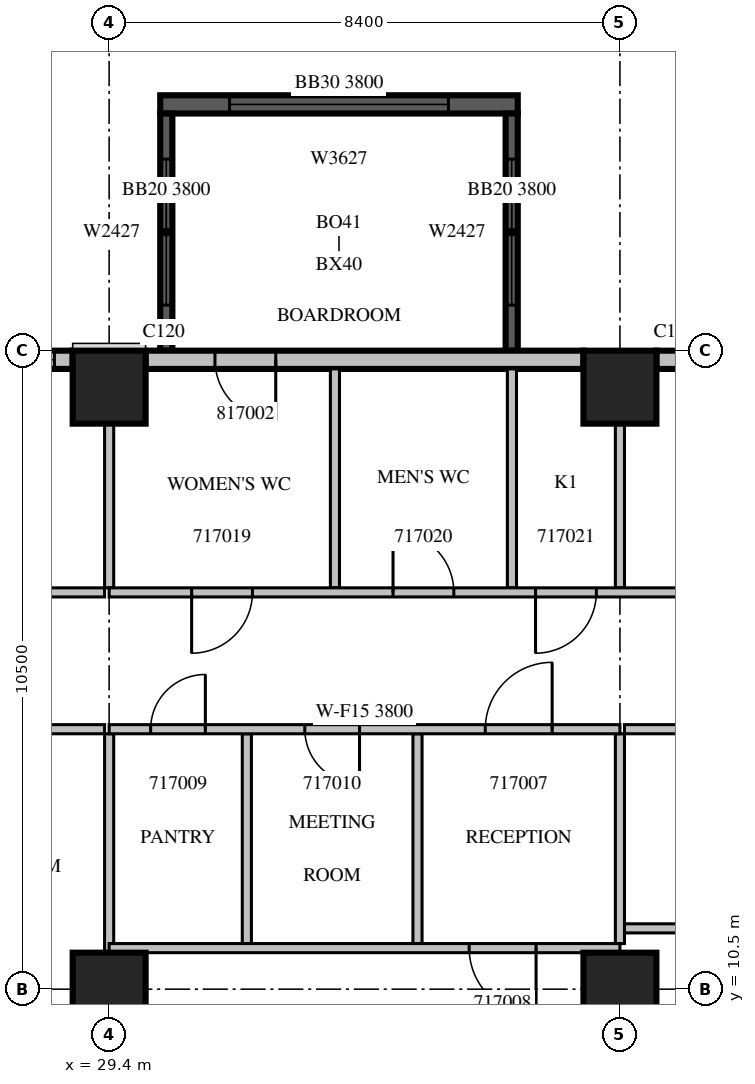
"""IFC4 building model, lengths in metres.
Left out: names, types, materials, properties, quantities, classifications, styles, units other than length and angle.
Written with IfcOpenShell. Run it as: python <this file> out.ifc"""

import sys

from ifc_helpers import new_model, si_unit, direction, frame, frame_2d, origin, origin_2d, place, context, subcontext, project, spatial, rectangle, extrude, source, transform, mapped, element, fill, save


model = new_model("IFC4")
c1 = context("Model", 3, precision=1e-05, world=origin(), true_north=direction((0.0, 1.0)))
c2 = subcontext(c1, "Body", "Model", "MODEL_VIEW")
j1 = project(units=[si_unit("LENGTHUNIT", "METRE"), si_unit("PLANEANGLEUNIT", "RADIAN")], contexts=[c1])
p1 = place(None, origin())
s1 = spatial("IfcSite", under=j1, at=p1, CompositionType="ELEMENT")
p2 = place(p1, origin())
s2 = spatial("IfcBuilding", under=s1, at=p2, CompositionType="ELEMENT")
p3 = place(p2, frame((0.0, 0.0, 82.5)))
s3 = spatial("IfcBuildingStorey", under=s2, at=p3, CompositionType="ELEMENT", Elevation=82.5)
m1 = source(origin(), c2, "Body", "SweptSolid", [
    extrude(rectangle(XDim=1.2, YDim=1.2, at=origin_2d()), origin(), (0.0, 0.0, 1.0), 4.2),
])
for number, where, z_axis, x_axis in (
    (1, (29.4, 10.5, 0.0), (0.0, 0.0, 1.0), (1.0, 0.0, 0.0)),
    (2, (37.8, 10.5, 0.0), (0.0, 0.0, 1.0), (1.0, 0.0, 0.0)),
    (3, (29.4, 20.4, 0.0), (0.0, 0.0, 1.0), (1.0, 0.0, 0.0)),
    (4, (37.8, 20.4, 0.0), (0.0, 0.0, 1.0), (1.0, 0.0, 0.0)),
):
    element("IfcColumn", number, at=place(p3, frame(where, z_axis=z_axis, x_axis=x_axis)), inside=s3, PredefinedType="COLUMN", context=c2, shape_type="MappedRepresentation", body=[
        mapped(m1, transform((0.0, 0.0, 0.0), scale=1.0)),
    ])
m2 = source(origin(), c2, "Body", "SweptSolid", [
    extrude(rectangle(XDim=5.88, YDim=0.3, at=frame_2d((2.94, 0.0))), origin(), (0.0, 0.0, 1.0), 3.8),
])
p4 = place(p3, frame((36.12, 25.05, 0.0), z_axis=(0.0, 0.0, 1.0), x_axis=(-1.0, 0.0, 0.0)))
e5 = element("IfcWall", 5, at=p4, inside=s3, PredefinedType="SOLIDWALL", context=c2, shape_type="MappedRepresentation", body=[
    mapped(m2, transform((0.0, 0.0, 0.0), scale=1.0)),
])
m3 = source(origin(), c2, "Body", "SweptSolid", [
    extrude(rectangle(XDim=3.6, YDim=2.7, at=frame_2d((1.8, 1.35))), frame((0.0, 0.16, 0.0), z_axis=(0.0, -1.0, 0.0), x_axis=(1.0, 0.0, 0.0)), (0.0, 0.0, 1.0), 0.32),
])
p5 = place(p4, frame((1.14, 0.0, 0.6)))
e6 = element("IfcOpeningElement", 6, at=p5, cuts=e5, PredefinedType="OPENING", context=c2, shape_type="MappedRepresentation", body=[
    mapped(m3, transform((0.0, 0.0, 0.0), scale=1.0)),
])
m4 = source(origin(), c2, "Body", "SweptSolid", [
    extrude(rectangle(XDim=3.9, YDim=0.2, at=frame_2d((1.95, 0.0))), origin(), (0.0, 0.0, 1.0), 3.8),
])
p6 = place(p3, frame((36.02, 21.0, 0.0), z_axis=(0.0, 0.0, 1.0), x_axis=(0.0, 1.0, 0.0)))
e7 = element("IfcWall", 7, at=p6, inside=s3, PredefinedType="SOLIDWALL", context=c2, shape_type="MappedRepresentation", body=[
    mapped(m4, transform((0.0, 0.0, 0.0), scale=1.0)),
])
m5 = source(origin(), c2, "Body", "SweptSolid", [
    extrude(rectangle(XDim=2.4, YDim=2.7, at=frame_2d((1.2, 1.35))), frame((0.0, 0.11, 0.0), z_axis=(0.0, -1.0, 0.0), x_axis=(1.0, 0.0, 0.0)), (0.0, 0.0, 1.0), 0.22),
])
p7 = place(p6, frame((0.75, 0.0, 0.6)))
e8 = element("IfcOpeningElement", 8, at=p7, cuts=e7, PredefinedType="OPENING", context=c2, shape_type="MappedRepresentation", body=[
    mapped(m5, transform((0.0, 0.0, 0.0), scale=1.0)),
])
p8 = place(p3, frame((30.34, 21.0, 0.0), z_axis=(0.0, 0.0, 1.0), x_axis=(0.0, 1.0, 0.0)))
e9 = element("IfcWall", 9, at=p8, inside=s3, PredefinedType="SOLIDWALL", context=c2, shape_type="MappedRepresentation", body=[
    mapped(m4, transform((0.0, 0.0, 0.0), scale=1.0)),
])
p9 = place(p8, frame((0.75, 0.0, 0.6)))
e10 = element("IfcOpeningElement", 10, at=p9, cuts=e9, PredefinedType="OPENING", context=c2, shape_type="MappedRepresentation", body=[
    mapped(m5, transform((0.0, 0.0, 0.0), scale=1.0)),
])
m6 = source(origin(), c2, "Body", "SweptSolid", [
    extrude(rectangle(XDim=7.2, YDim=0.3, at=frame_2d((3.6, 0.0))), origin(), (0.0, 0.0, 1.0), 3.8),
])
p10 = place(p3, frame((45.6, 20.85, 0.0), z_axis=(0.0, 0.0, 1.0), x_axis=(-1.0, 0.0, 0.0)))
e11 = element("IfcWall", 11, at=p10, inside=s3, PredefinedType="STANDARD", context=c2, shape_type="MappedRepresentation", body=[
    mapped(m6, transform((0.0, 0.0, 0.0), scale=1.0)),
])
m7 = source(origin(), c2, "Body", "SweptSolid", [
    extrude(rectangle(XDim=2.4, YDim=2.7, at=frame_2d((1.2, 1.35))), frame((0.0, 0.16, 0.0), z_axis=(0.0, -1.0, 0.0), x_axis=(1.0, 0.0, 0.0)), (0.0, 0.0, 1.0), 0.32),
])
p11 = place(p10, frame((0.3, 0.0, 0.6)))
e12 = element("IfcOpeningElement", 12, at=p11, cuts=e11, PredefinedType="OPENING", context=c2, shape_type="MappedRepresentation", body=[
    mapped(m7, transform((0.0, 0.0, 0.0), scale=1.0)),
])
p12 = place(p10, frame((3.75, 0.0, 0.6)))
e13 = element("IfcOpeningElement", 13, at=p12, cuts=e11, PredefinedType="OPENING", context=c2, shape_type="MappedRepresentation", body=[
    mapped(m7, transform((0.0, 0.0, 0.0), scale=1.0)),
])
p13 = place(p3, frame((37.2, 20.85, 0.0), z_axis=(0.0, 0.0, 1.0), x_axis=(-1.0, 0.0, 0.0)))
e14 = element("IfcWall", 14, at=p13, inside=s3, PredefinedType="STANDARD", context=c2, shape_type="MappedRepresentation", body=[
    mapped(m6, transform((0.0, 0.0, 0.0), scale=1.0)),
])
m8 = source(origin(), c2, "Body", "SweptSolid", [
    extrude(rectangle(XDim=1.0, YDim=2.1, at=frame_2d((0.5, 1.05))), frame((0.0, 0.16, 0.0), z_axis=(0.0, -1.0, 0.0), x_axis=(1.0, 0.0, 0.0)), (0.0, 0.0, 1.0), 0.32),
])
p14 = place(p13, frame((5.06, 0.0, 0.0)))
e15 = element("IfcOpeningElement", 15, at=p14, cuts=e14, PredefinedType="OPENING", context=c2, shape_type="MappedRepresentation", body=[
    mapped(m8, transform((0.0, 0.0, 0.0), scale=1.0)),
])
m9 = source(origin(), c2, "Body", "SweptSolid", [
    extrude(rectangle(XDim=6.6, YDim=0.3, at=frame_2d((3.3, 0.0))), origin(), (0.0, 0.0, 1.0), 3.8),
])
p15 = place(p3, frame((28.8, 20.85, 0.0), z_axis=(0.0, 0.0, 1.0), x_axis=(-1.0, 0.0, 0.0)))
e16 = element("IfcWall", 16, at=p15, inside=s3, PredefinedType="STANDARD", context=c2, shape_type="MappedRepresentation", body=[
    mapped(m9, transform((0.0, 0.0, 0.0), scale=1.0)),
])
p16 = place(p15, frame((0.3, 0.0, 0.6)))
e17 = element("IfcOpeningElement", 17, at=p16, cuts=e16, PredefinedType="OPENING", context=c2, shape_type="MappedRepresentation", body=[
    mapped(m7, transform((0.0, 0.0, 0.0), scale=1.0)),
])
m10 = source(origin(), c2, "Body", "SweptSolid", [
    extrude(rectangle(XDim=1.2, YDim=2.7, at=frame_2d((0.6, 1.35))), frame((0.0, 0.16, 0.0), z_axis=(0.0, -1.0, 0.0), x_axis=(1.0, 0.0, 0.0)), (0.0, 0.0, 1.0), 0.32),
])
p17 = place(p15, frame((4.412, 0.0, 0.6)))
e18 = element("IfcOpeningElement", 18, at=p17, cuts=e16, PredefinedType="OPENING", context=c2, shape_type="MappedRepresentation", body=[
    mapped(m10, transform((0.0, 0.0, 0.0), scale=1.0)),
])
m11 = source(origin(), c2, "Body", "SweptSolid", [
    extrude(rectangle(XDim=4.45, YDim=0.15, at=frame_2d((2.225, 0.0))), origin(), (0.0, 0.0, 1.0), 3.8),
])
for number, where, z_axis, x_axis in (
    (19, (29.325, 14.775, 0.0), (0.0, 0.0, 1.0), (-1.0, 0.0, 0.0)),
    (20, (24.875, 17.025, 0.0), (0.0, 0.0, 1.0), (1.0, 0.0, 0.0)),
):
    element("IfcWall", number, at=place(p3, frame(where, z_axis=z_axis, x_axis=x_axis)), inside=s3, PredefinedType="PARTITIONING", context=c2, shape_type="MappedRepresentation", body=[
        mapped(m11, transform((0.0, 0.0, 0.0), scale=1.0)),
    ])
m12 = source(origin(), c2, "Body", "SweptSolid", [
    extrude(rectangle(XDim=3.601, YDim=0.15, at=frame_2d((1.8, 0.0))), origin(), (0.0, 0.0, 1.0), 3.8),
])
p18 = place(p3, frame((29.4, 11.099, 0.0), z_axis=(0.0, 0.0, 1.0), x_axis=(0.0, 1.0, 0.0)))
e21 = element("IfcWall", 21, at=p18, inside=s3, PredefinedType="PARTITIONING", context=c2, shape_type="MappedRepresentation", body=[
    mapped(m12, transform((0.0, 0.0, 0.0), scale=1.0)),
])
m13 = source(origin(), c2, "Body", "SweptSolid", [
    extrude(rectangle(XDim=2.701, YDim=0.15, at=frame_2d((1.351, 0.0))), origin(), (0.0, 0.0, 1.0), 3.8),
])
p19 = place(p3, frame((29.4, 17.1, 0.0), z_axis=(0.0, 0.0, 1.0), x_axis=(0.0, 1.0, 0.0)))
e22 = element("IfcWall", 22, at=p19, inside=s3, PredefinedType="PARTITIONING", context=c2, shape_type="MappedRepresentation", body=[
    mapped(m13, transform((0.0, 0.0, 0.0), scale=1.0)),
])
m14 = source(origin(), c2, "Body", "SweptSolid", [
    extrude(rectangle(XDim=6.45, YDim=0.15, at=frame_2d((3.225, 0.0))), origin(), (0.0, 0.0, 1.0), 3.8),
])
p20 = place(p3, frame((37.875, 11.5, 0.0), z_axis=(0.0, 0.0, 1.0), x_axis=(1.0, 0.0, 0.0)))
e23 = element("IfcWall", 23, at=p20, inside=s3, PredefinedType="PARTITIONING", context=c2, shape_type="MappedRepresentation", body=[
    mapped(m14, transform((0.0, 0.0, 0.0), scale=1.0)),
])
p21 = place(p3, frame((44.325, 14.775, 0.0), z_axis=(0.0, 0.0, 1.0), x_axis=(-1.0, 0.0, 0.0)))
e24 = element("IfcWall", 24, at=p21, inside=s3, PredefinedType="PARTITIONING", context=c2, shape_type="MappedRepresentation", body=[
    mapped(m14, transform((0.0, 0.0, 0.0), scale=1.0)),
])
m15 = source(origin(), c2, "Body", "SweptSolid", [
    extrude(rectangle(XDim=0.9, YDim=2.1, at=frame_2d((0.45, 1.05))), frame((0.0, 0.085, 0.0), z_axis=(0.0, -1.0, 0.0), x_axis=(1.0, 0.0, 0.0)), (0.0, 0.0, 1.0), 0.17),
])
p22 = place(p21, frame((2.812, 0.0, 0.0)))
e25 = element("IfcOpeningElement", 25, at=p22, cuts=e24, PredefinedType="OPENING", context=c2, shape_type="MappedRepresentation", body=[
    mapped(m15, transform((0.0, 0.0, 0.0), scale=1.0)),
])
m16 = source(origin(), c2, "Body", "SweptSolid", [
    extrude(rectangle(XDim=3.45, YDim=0.15, at=frame_2d((1.725, 0.0))), origin(), (0.0, 0.0, 1.0), 3.8),
])
for number, where, z_axis, x_axis in (
    (26, (31.665, 11.25, 0.0), (0.0, 0.0, 1.0), (0.0, 1.0, 0.0)),
    (27, (34.471, 11.25, 0.0), (0.0, 0.0, 1.0), (0.0, 1.0, 0.0)),
    (28, (37.8, 11.25, 0.0), (0.0, 0.0, 1.0), (0.0, 1.0, 0.0)),
):
    element("IfcWall", number, at=place(p3, frame(where, z_axis=z_axis, x_axis=x_axis)), inside=s3, PredefinedType="PARTITIONING", context=c2, shape_type="MappedRepresentation", body=[
        mapped(m16, transform((0.0, 0.0, 0.0), scale=1.0)),
    ])
m17 = source(origin(), c2, "Body", "SweptSolid", [
    extrude(rectangle(XDim=8.4, YDim=0.15, at=frame_2d((4.2, 0.0))), origin(), (0.0, 0.0, 1.0), 3.8),
])
p23 = place(p3, frame((37.8, 11.175, 0.0), z_axis=(0.0, 0.0, 1.0), x_axis=(-1.0, 0.0, 0.0)))
e29 = element("IfcWall", 29, at=p23, inside=s3, PredefinedType="PARTITIONING", context=c2, shape_type="MappedRepresentation", body=[
    mapped(m17, transform((0.0, 0.0, 0.0), scale=1.0)),
])
m18 = source(origin(), c2, "Body", "SweptSolid", [
    extrude(rectangle(XDim=1.1, YDim=2.1, at=frame_2d((0.55, 1.05))), frame((0.0, 0.085, 0.0), z_axis=(0.0, -1.0, 0.0), x_axis=(1.0, 0.0, 0.0)), (0.0, 0.0, 1.0), 0.17),
])
p24 = place(p23, frame((1.379, 0.0, 0.0)))
e30 = element("IfcOpeningElement", 30, at=p24, cuts=e29, PredefinedType="OPENING", context=c2, shape_type="MappedRepresentation", body=[
    mapped(m18, transform((0.0, 0.0, 0.0), scale=1.0)),
])
m19 = source(origin(), c2, "Body", "SweptSolid", [
    extrude(rectangle(XDim=3.6, YDim=0.15, at=frame_2d((1.8, 0.0))), origin(), (0.0, 0.0, 1.0), 3.8),
])
for number, where, z_axis, x_axis in (
    (31, (33.113, 20.7, 0.0), (0.0, 0.0, 1.0), (0.0, -1.0, 0.0)),
    (32, (36.024, 20.7, 0.0), (0.0, 0.0, 1.0), (0.0, -1.0, 0.0)),
):
    element("IfcWall", number, at=place(p3, frame(where, z_axis=z_axis, x_axis=x_axis)), inside=s3, PredefinedType="PARTITIONING", context=c2, shape_type="MappedRepresentation", body=[
        mapped(m19, transform((0.0, 0.0, 0.0), scale=1.0)),
    ])
p25 = place(p3, frame((37.8, 17.1, 0.0), z_axis=(0.0, 0.0, 1.0), x_axis=(0.0, 1.0, 0.0)))
e33 = element("IfcWall", 33, at=p25, inside=s3, PredefinedType="PARTITIONING", context=c2, shape_type="MappedRepresentation", body=[
    mapped(m13, transform((0.0, 0.0, 0.0), scale=1.0)),
])
p26 = place(p3, frame((37.8, 14.775, 0.0), z_axis=(0.0, 0.0, 1.0), x_axis=(-1.0, 0.0, 0.0)))
e34 = element("IfcWall", 34, at=p26, inside=s3, PredefinedType="PARTITIONING", context=c2, shape_type="MappedRepresentation", body=[
    mapped(m17, transform((0.0, 0.0, 0.0), scale=1.0)),
])
p27 = place(p26, frame((1.115, 0.0, 0.0)))
e35 = element("IfcOpeningElement", 35, at=p27, cuts=e34, PredefinedType="OPENING", context=c2, shape_type="MappedRepresentation", body=[
    mapped(m18, transform((0.0, 0.0, 0.0), scale=1.0)),
])
p28 = place(p26, frame((6.818, 0.0, 0.0)))
e36 = element("IfcOpeningElement", 36, at=p28, cuts=e34, PredefinedType="OPENING", context=c2, shape_type="MappedRepresentation", body=[
    mapped(m15, transform((0.0, 0.0, 0.0), scale=1.0)),
])
p29 = place(p26, frame((4.282, 0.0, 0.0)))
e37 = element("IfcOpeningElement", 37, at=p29, cuts=e34, PredefinedType="OPENING", context=c2, shape_type="MappedRepresentation", body=[
    mapped(m15, transform((0.0, 0.0, 0.0), scale=1.0)),
])
m20 = source(origin(), c2, "Body", "SweptSolid", [
    extrude(rectangle(XDim=37.5, YDim=0.15, at=frame_2d((18.75, 0.0))), origin(), (0.0, 0.0, 1.0), 3.8),
])
p30 = place(p3, frame((29.4, 17.025, 0.0), z_axis=(0.0, 0.0, 1.0), x_axis=(1.0, 0.0, 0.0)))
e38 = element("IfcWall", 38, at=p30, inside=s3, PredefinedType="PARTITIONING", context=c2, shape_type="MappedRepresentation", body=[
    mapped(m20, transform((0.0, 0.0, 0.0), scale=1.0)),
])
m21 = source(origin(), c2, "Body", "SweptSolid", [
    extrude(rectangle(XDim=1.0, YDim=2.1, at=frame_2d((0.5, 1.05))), frame((0.0, 0.085, 0.0), z_axis=(0.0, -1.0, 0.0), x_axis=(1.0, 0.0, 0.0)), (0.0, 0.0, 1.0), 0.17),
])
p31 = place(p30, frame((1.357, 0.0, 0.0)))
e39 = element("IfcOpeningElement", 39, at=p31, cuts=e38, PredefinedType="OPENING", context=c2, shape_type="MappedRepresentation", body=[
    mapped(m21, transform((0.0, 0.0, 0.0), scale=1.0)),
])
p32 = place(p30, frame((4.669, 0.0, 0.0)))
e40 = element("IfcOpeningElement", 40, at=p32, cuts=e38, PredefinedType="OPENING", context=c2, shape_type="MappedRepresentation", body=[
    mapped(m21, transform((0.0, 0.0, 0.0), scale=1.0)),
])
p33 = place(p30, frame((7.012, 0.0, 0.0)))
e41 = element("IfcOpeningElement", 41, at=p33, cuts=e38, PredefinedType="OPENING", context=c2, shape_type="MappedRepresentation", body=[
    mapped(m21, transform((0.0, 0.0, 0.0), scale=1.0)),
])
p34 = place(p30, frame((12.1, 0.0, 0.0)))
e42 = element("IfcOpeningElement", 42, at=p34, cuts=e38, PredefinedType="OPENING", context=c2, shape_type="MappedRepresentation", body=[
    mapped(m21, transform((0.0, 0.0, 0.0), scale=1.0)),
])
p35 = place(p30, frame((18.898, 0.0, 0.0)))
e43 = element("IfcOpeningElement", 43, at=p35, cuts=e38, PredefinedType="OPENING", context=c2, shape_type="MappedRepresentation", body=[
    mapped(m21, transform((0.0, 0.0, 0.0), scale=1.0)),
])
p36 = place(p30, frame((23.543, 0.0, 0.0)))
e44 = element("IfcOpeningElement", 44, at=p36, cuts=e38, PredefinedType="OPENING", context=c2, shape_type="MappedRepresentation", body=[
    mapped(m21, transform((0.0, 0.0, 0.0), scale=1.0)),
])
p37 = place(p30, frame((26.826, 0.0, 0.0)))
e45 = element("IfcOpeningElement", 45, at=p37, cuts=e38, PredefinedType="OPENING", context=c2, shape_type="MappedRepresentation", body=[
    mapped(m21, transform((0.0, 0.0, 0.0), scale=1.0)),
])
m22 = source(origin(), c2, "Body", "SweptSolid", [
    extrude(rectangle(XDim=1.2, YDim=2.1, at=frame_2d((0.6, 1.05))), frame((0.0, 0.085, 0.0), z_axis=(0.0, -1.0, 0.0), x_axis=(1.0, 0.0, 0.0)), (0.0, 0.0, 1.0), 0.17),
])
p38 = place(p30, frame((30.214, 0.0, 0.0)))
e46 = element("IfcOpeningElement", 46, at=p38, cuts=e38, PredefinedType="OPENING", context=c2, shape_type="MappedRepresentation", body=[
    mapped(m22, transform((0.0, 0.0, 0.0), scale=1.0)),
])
p39 = place(p30, frame((34.721, 0.0, 0.0)))
e47 = element("IfcOpeningElement", 47, at=p39, cuts=e38, PredefinedType="OPENING", context=c2, shape_type="MappedRepresentation", body=[
    mapped(m22, transform((0.0, 0.0, 0.0), scale=1.0)),
])
m23 = source(origin(), c2, "Body", "SweptSolid", [
    extrude(rectangle(XDim=3.6, YDim=2.7, at=frame_2d((1.8, 1.35))), frame((0.0, 0.03, 0.0), z_axis=(0.0, -1.0, 0.0), x_axis=(1.0, 0.0, 0.0)), (0.0, 0.0, 1.0), 0.06),
])
p40 = place(p5, origin())
e48 = element("IfcWindow", 48, at=p40, inside=s3, PartitioningType="SINGLE_PANEL", PredefinedType="WINDOW", context=c2, shape_type="MappedRepresentation", body=[
    mapped(m23, transform((0.0, 0.0, 0.0), scale=1.0)),
])
fill(e6, e48)
m24 = source(origin(), c2, "Body", "SweptSolid", [
    extrude(rectangle(XDim=2.4, YDim=2.7, at=frame_2d((1.2, 1.35))), frame((0.0, 0.03, 0.0), z_axis=(0.0, -1.0, 0.0), x_axis=(1.0, 0.0, 0.0)), (0.0, 0.0, 1.0), 0.06),
])
p41 = place(p7, origin())
e49 = element("IfcWindow", 49, at=p41, inside=s3, PartitioningType="SINGLE_PANEL", PredefinedType="WINDOW", context=c2, shape_type="MappedRepresentation", body=[
    mapped(m24, transform((0.0, 0.0, 0.0), scale=1.0)),
])
fill(e8, e49)
p42 = place(p9, origin())
e50 = element("IfcWindow", 50, at=p42, inside=s3, PartitioningType="SINGLE_PANEL", PredefinedType="WINDOW", context=c2, shape_type="MappedRepresentation", body=[
    mapped(m24, transform((0.0, 0.0, 0.0), scale=1.0)),
])
fill(e10, e50)
p43 = place(p16, origin())
e51 = element("IfcWindow", 51, at=p43, inside=s3, PartitioningType="SINGLE_PANEL", PredefinedType="WINDOW", context=c2, shape_type="MappedRepresentation", body=[
    mapped(m24, transform((0.0, 0.0, 0.0), scale=1.0)),
])
fill(e17, e51)
m25 = source(origin(), c2, "Body", "SweptSolid", [
    extrude(rectangle(XDim=1.1, YDim=2.1, at=frame_2d((0.55, 1.05))), frame((0.0, 0.025, 0.0), z_axis=(0.0, -1.0, 0.0), x_axis=(1.0, 0.0, 0.0)), (0.0, 0.0, 1.0), 0.05),
])
p44 = place(p27, origin())
e52 = element("IfcDoor", 52, at=p44, inside=s3, OperationType="SINGLE_SWING_RIGHT", PredefinedType="DOOR", context=c2, shape_type="MappedRepresentation", body=[
    mapped(m25, transform((0.0, 0.0, 0.0), scale=1.0)),
])
fill(e35, e52)
p45 = place(p24, origin())
e53 = element("IfcDoor", 53, at=p45, inside=s3, OperationType="SINGLE_SWING_LEFT", PredefinedType="DOOR", context=c2, shape_type="MappedRepresentation", body=[
    mapped(m25, transform((0.0, 0.0, 0.0), scale=1.0)),
])
fill(e30, e53)
m26 = source(origin(), c2, "Body", "SweptSolid", [
    extrude(rectangle(XDim=0.9, YDim=2.1, at=frame_2d((0.45, 1.05))), frame((0.0, 0.025, 0.0), z_axis=(0.0, -1.0, 0.0), x_axis=(1.0, 0.0, 0.0)), (0.0, 0.0, 1.0), 0.05),
])
p46 = place(p28, origin())
e54 = element("IfcDoor", 54, at=p46, inside=s3, OperationType="SINGLE_SWING_RIGHT", PredefinedType="DOOR", context=c2, shape_type="MappedRepresentation", body=[
    mapped(m26, transform((0.0, 0.0, 0.0), scale=1.0)),
])
fill(e36, e54)
p47 = place(p29, origin())
e55 = element("IfcDoor", 55, at=p47, inside=s3, OperationType="SINGLE_SWING_LEFT", PredefinedType="DOOR", context=c2, shape_type="MappedRepresentation", body=[
    mapped(m26, transform((0.0, 0.0, 0.0), scale=1.0)),
])
fill(e37, e55)
m27 = source(origin(), c2, "Body", "SweptSolid", [
    extrude(rectangle(XDim=1.0, YDim=2.1, at=frame_2d((0.5, 1.05))), frame((0.0, 0.025, 0.0), z_axis=(0.0, -1.0, 0.0), x_axis=(1.0, 0.0, 0.0)), (0.0, 0.0, 1.0), 0.05),
])
p48 = place(p31, origin())
e56 = element("IfcDoor", 56, at=p48, inside=s3, OperationType="SINGLE_SWING_RIGHT", PredefinedType="DOOR", context=c2, shape_type="MappedRepresentation", body=[
    mapped(m27, transform((0.0, 0.0, 0.0), scale=1.0)),
])
fill(e39, e56)
p49 = place(p32, origin())
e57 = element("IfcDoor", 57, at=p49, inside=s3, OperationType="SINGLE_SWING_LEFT", PredefinedType="DOOR", context=c2, shape_type="MappedRepresentation", body=[
    mapped(m27, transform((0.0, 0.0, 0.0), scale=1.0)),
])
fill(e40, e57)
p50 = place(p33, origin())
e58 = element("IfcDoor", 58, at=p50, inside=s3, OperationType="SINGLE_SWING_RIGHT", PredefinedType="DOOR", context=c2, shape_type="MappedRepresentation", body=[
    mapped(m27, transform((0.0, 0.0, 0.0), scale=1.0)),
])
fill(e41, e58)
p51 = place(p14, origin())
e59 = element("IfcDoor", 59, at=p51, inside=s3, OperationType="SINGLE_SWING_LEFT", PredefinedType="DOOR", context=c2, shape_type="MappedRepresentation", body=[
    mapped(m27, transform((0.0, 0.0, 0.0), scale=1.0)),
])
fill(e15, e59)
save(model, sys.argv[1])
